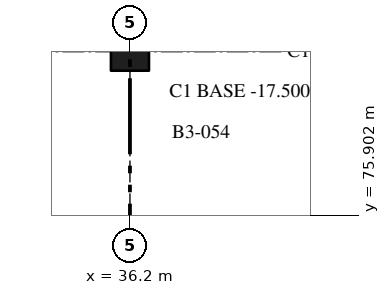
"""IFC4 building model, lengths in metres.
Left out: names, types, materials, properties, quantities, classifications, styles, units other than length and angle.
Written with IfcOpenShell. Run it as: python <this file> out.ifc"""

import sys

from ifc_helpers import new_model, si_unit, direction, frame, origin, origin_2d, place, context, subcontext, project, spatial, rectangle, extrude, element, save


model = new_model("IFC4")
c1 = context("Model", 3, precision=1e-05, world=origin(), true_north=direction((0.0, 1.0)))
c2 = subcontext(c1, "Body", "Model", "MODEL_VIEW")
j1 = project(units=[si_unit("LENGTHUNIT", "METRE"), si_unit("PLANEANGLEUNIT", "RADIAN")], contexts=[c1])
p1 = place(None, origin())
s1 = spatial("IfcSite", under=j1, at=p1, CompositionType="ELEMENT")
p2 = place(p1, origin())
s2 = spatial("IfcBuilding", under=s1, at=p2, CompositionType="ELEMENT")
p3 = place(p2, frame((0.0, 0.0, -17.0)))
s3 = spatial("IfcBuildingStorey", under=s2, at=p3, CompositionType="ELEMENT", Elevation=-17.0)
p4 = place(p3, frame((36.2, 80.2, -0.5), z_axis=(0.0, 0.0, 1.0), x_axis=(1.0, 0.0, 0.0)))
e1 = element("IfcColumn", 1, at=p4, inside=s3, PredefinedType="COLUMN", context=c2, shape_type="SweptSolid", body=[
    extrude(rectangle(XDim=1.0, YDim=1.0, at=origin_2d()), origin(), (0.0, 0.0, 1.0), 5.5),
])
save(model, sys.argv[1])
